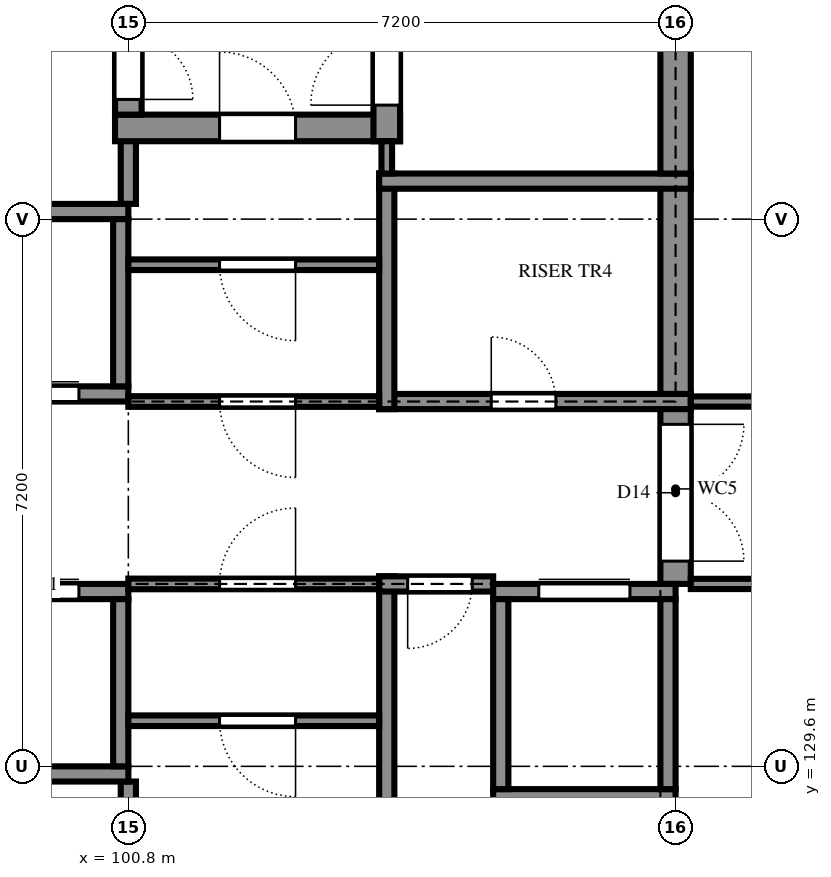
"""IFC4 building model, lengths in metres.
Left out: names, types, materials, properties, quantities, classifications, styles, units other than length and angle.
Written with IfcOpenShell. Run it as: python <this file> out.ifc"""

import sys

from ifc_helpers import new_model, si_unit, direction, frame, frame_2d, origin, place, context, subcontext, project, spatial, rectangle, extrude, element, fill, save


model = new_model("IFC4")
c1 = context("Model", 3, precision=1e-05, world=origin(), true_north=direction((0.0, 1.0)))
c2 = subcontext(c1, "Body", "Model", "MODEL_VIEW")
j1 = project(units=[si_unit("LENGTHUNIT", "METRE"), si_unit("PLANEANGLEUNIT", "RADIAN")], contexts=[c1])
p1 = place(None, origin())
s1 = spatial("IfcSite", under=j1, at=p1, CompositionType="ELEMENT")
p2 = place(p1, origin())
s2 = spatial("IfcBuilding", under=s1, at=p2, CompositionType="ELEMENT")
p3 = place(p2, frame((0.0, 0.0, 18.0)))
s3 = spatial("IfcBuildingStorey", under=s2, at=p3, CompositionType="ELEMENT", Elevation=18.0)
p4 = place(p3, frame((100.8, 128.575, 0.0), z_axis=(0.0, 0.0, 1.0), x_axis=(0.0, 1.0, 0.0)))
e1 = element("IfcWall", 1, at=p4, inside=s3, PredefinedType="SHEAR", context=c2, shape_type="SweptSolid", body=[
    extrude(rectangle(XDim=0.825, YDim=0.2, at=frame_2d((0.413, 0.0))), origin(), (0.0, 0.0, 1.0), 3.6),
])
p5 = place(p3, frame((104.2, 132.1, 0.0), z_axis=(0.0, 0.0, 1.0), x_axis=(0.0, -1.0, 0.0)))
e2 = element("IfcWall", 2, at=p5, inside=s3, PredefinedType="SHEAR", context=c2, shape_type="SweptSolid", body=[
    extrude(rectangle(XDim=3.525, YDim=0.2, at=frame_2d((1.763, 0.0))), origin(), (0.0, 0.0, 1.0), 3.6),
])
p6 = place(p3, frame((105.6, 132.0, 0.0), z_axis=(0.0, 0.0, 1.0), x_axis=(-1.0, 0.0, 0.0)))
e3 = element("IfcWall", 3, at=p6, inside=s3, PredefinedType="SHEAR", context=c2, shape_type="SweptSolid", body=[
    extrude(rectangle(XDim=1.5, YDim=0.2, at=frame_2d((0.75, 0.0))), origin(), (0.0, 0.0, 1.0), 3.6),
])
p7 = place(p6, frame((0.275, 0.0, 0.0)))
e4 = element("IfcOpeningElement", 4, at=p7, cuts=e3, PredefinedType="OPENING", context=c2, shape_type="SweptSolid", body=[
    extrude(rectangle(XDim=0.85, YDim=2.1, at=frame_2d((0.425, 1.05))), frame((0.0, 0.11, 0.0), z_axis=(0.0, -1.0, 0.0), x_axis=(1.0, 0.0, 0.0)), (0.0, 0.0, 1.0), 0.22),
])
p8 = place(p3, frame((108.0, 132.0, 0.0), z_axis=(0.0, 0.0, 1.0), x_axis=(0.0, 1.0, 0.0)))
e5 = element("IfcWall", 5, at=p8, inside=s3, PredefinedType="SHEAR", context=c2, shape_type="SweptSolid", body=[
    extrude(rectangle(XDim=2.5, YDim=0.4, at=frame_2d((1.25, 0.0))), origin(), (0.0, 0.0, 1.0), 3.6),
])
p9 = place(p8, frame((0.3, 0.0, 0.0)))
e6 = element("IfcOpeningElement", 6, at=p9, cuts=e5, PredefinedType="OPENING", context=c2, shape_type="SweptSolid", body=[
    extrude(rectangle(XDim=1.8, YDim=2.1, at=frame_2d((0.9, 1.05))), frame((0.0, 0.21, 0.0), z_axis=(0.0, -1.0, 0.0), x_axis=(1.0, 0.0, 0.0)), (0.0, 0.0, 1.0), 0.42),
])
p10 = place(p3, frame((104.1, 134.4, 0.0), z_axis=(0.0, 0.0, 1.0), x_axis=(1.0, 0.0, 0.0)))
e7 = element("IfcWall", 7, at=p10, inside=s3, PredefinedType="SHEAR", context=c2, shape_type="SweptSolid", body=[
    extrude(rectangle(XDim=4.1, YDim=0.2, at=frame_2d((2.05, 0.0))), origin(), (0.0, 0.0, 1.0), 3.6),
])
p11 = place(p10, frame((1.475, 0.0, 0.0)))
e8 = element("IfcOpeningElement", 8, at=p11, cuts=e7, PredefinedType="OPENING", context=c2, shape_type="SweptSolid", body=[
    extrude(rectangle(XDim=0.85, YDim=2.1, at=frame_2d((0.425, 1.05))), frame((0.0, 0.11, 0.0), z_axis=(0.0, -1.0, 0.0), x_axis=(1.0, 0.0, 0.0)), (0.0, 0.0, 1.0), 0.22),
])
p12 = place(p3, frame((108.0, 134.5, 0.0), z_axis=(0.0, 0.0, 1.0), x_axis=(0.0, 1.0, 0.0)))
e9 = element("IfcWall", 9, at=p12, inside=s3, PredefinedType="SHEAR", context=c2, shape_type="SweptSolid", body=[
    extrude(rectangle(XDim=2.9, YDim=0.4, at=frame_2d((1.45, 0.0))), origin(), (0.0, 0.0, 1.0), 3.6),
])
p13 = place(p3, frame((100.8, 137.0, 0.0), z_axis=(0.0, 0.0, 1.0), x_axis=(0.0, 1.0, 0.0)))
e10 = element("IfcWall", 10, at=p13, inside=s3, PredefinedType="SHEAR", context=c2, shape_type="SweptSolid", body=[
    extrude(rectangle(XDim=1.175, YDim=0.2, at=frame_2d((0.587, 0.0))), origin(), (0.0, 0.0, 1.0), 3.6),
])
p14 = place(p3, frame((104.2, 137.4, 0.0), z_axis=(0.0, 0.0, 1.0), x_axis=(0.0, -1.0, 0.0)))
e11 = element("IfcWall", 11, at=p14, inside=s3, PredefinedType="SHEAR", context=c2, shape_type="SweptSolid", body=[
    extrude(rectangle(XDim=3.1, YDim=0.2, at=frame_2d((1.55, 0.0))), origin(), (0.0, 0.0, 1.0), 3.6),
])
p15 = place(p3, frame((108.2, 137.3, 0.0), z_axis=(0.0, 0.0, 1.0), x_axis=(-1.0, 0.0, 0.0)))
e12 = element("IfcWall", 12, at=p15, inside=s3, PredefinedType="SHEAR", context=c2, shape_type="SweptSolid", body=[
    extrude(rectangle(XDim=4.1, YDim=0.2, at=frame_2d((2.05, 0.0))), origin(), (0.0, 0.0, 1.0), 3.6),
])
p16 = place(p3, frame((108.0, 137.4, 0.0), z_axis=(0.0, 0.0, 1.0), x_axis=(0.0, 1.0, 0.0)))
e13 = element("IfcWall", 13, at=p16, inside=s3, PredefinedType="SHEAR", context=c2, shape_type="SweptSolid", body=[
    extrude(rectangle(XDim=6.6, YDim=0.4, at=frame_2d((3.3, 0.0))), origin(), (0.0, 0.0, 1.0), 3.6),
])
p17 = place(p3, frame((100.625, 138.0, 0.0), z_axis=(0.0, 0.0, 1.0), x_axis=(1.0, 0.0, 0.0)))
e14 = element("IfcWall", 14, at=p17, inside=s3, PredefinedType="SHEAR", context=c2, shape_type="SweptSolid", body=[
    extrude(rectangle(XDim=3.75, YDim=0.35, at=frame_2d((1.875, 0.0))), origin(), (0.0, 0.0, 1.0), 3.6),
])
p18 = place(p17, frame((1.375, 0.0, 0.0)))
e15 = element("IfcOpeningElement", 15, at=p18, cuts=e14, PredefinedType="OPENING", context=c2, shape_type="SweptSolid", body=[
    extrude(rectangle(XDim=1.0, YDim=2.1, at=frame_2d((0.5, 1.05))), frame((0.0, 0.185, 0.0), z_axis=(0.0, -1.0, 0.0), x_axis=(1.0, 0.0, 0.0)), (0.0, 0.0, 1.0), 0.37),
])
p19 = place(p3, frame((104.2, 137.825, 0.0), z_axis=(0.0, 0.0, 1.0), x_axis=(0.0, 1.0, 0.0)))
e16 = element("IfcWall", 16, at=p19, inside=s3, PredefinedType="SHEAR", context=c2, shape_type="SweptSolid", body=[
    extrude(rectangle(XDim=3.475, YDim=0.35, at=frame_2d((1.738, 0.0))), origin(), (0.0, 0.0, 1.0), 3.6),
])
p20 = place(p19, frame((0.475, 0.0, 0.0)))
e17 = element("IfcOpeningElement", 17, at=p20, cuts=e16, PredefinedType="OPENING", context=c2, shape_type="SweptSolid", body=[
    extrude(rectangle(XDim=1.0, YDim=2.1, at=frame_2d((0.5, 1.05))), frame((0.0, 0.185, 0.0), z_axis=(0.0, -1.0, 0.0), x_axis=(1.0, 0.0, 0.0)), (0.0, 0.0, 1.0), 0.37),
])
p21 = place(p3, frame((100.8, 144.175, 0.0), z_axis=(0.0, 0.0, 1.0), x_axis=(0.0, -1.0, 0.0)))
e18 = element("IfcWall", 18, at=p21, inside=s3, PredefinedType="SHEAR", context=c2, shape_type="SweptSolid", body=[
    extrude(rectangle(XDim=6.0, YDim=0.35, at=frame_2d((3.0, 0.0))), origin(), (0.0, 0.0, 1.0), 3.6),
])
p22 = place(p21, frame((4.95, 0.0, 0.0)))
e19 = element("IfcOpeningElement", 19, at=p22, cuts=e18, PredefinedType="OPENING", context=c2, shape_type="SweptSolid", body=[
    extrude(rectangle(XDim=0.85, YDim=2.1, at=frame_2d((0.425, 1.05))), frame((0.0, 0.185, 0.0), z_axis=(0.0, -1.0, 0.0), x_axis=(1.0, 0.0, 0.0)), (0.0, 0.0, 1.0), 0.37),
])
p23 = place(p3, frame((98.4, 129.5, 0.0), z_axis=(0.0, 0.0, 1.0), x_axis=(1.0, 0.0, 0.0)))
e20 = element("IfcWall", 20, at=p23, inside=s3, PredefinedType="SHEAR", context=c2, shape_type="SweptSolid", body=[
    extrude(rectangle(XDim=2.4, YDim=0.2, at=frame_2d((1.2, 0.0))), origin(), (0.0, 0.0, 1.0), 3.6),
])
p24 = place(p3, frame((98.4, 131.9, 0.0), z_axis=(0.0, 0.0, 1.0), x_axis=(1.0, 0.0, 0.0)))
e21 = element("IfcWall", 21, at=p24, inside=s3, PredefinedType="SHEAR", context=c2, shape_type="SweptSolid", body=[
    extrude(rectangle(XDim=2.4, YDim=0.2, at=frame_2d((1.2, 0.0))), origin(), (0.0, 0.0, 1.0), 3.6),
])
p25 = place(p24, frame((0.65, 0.0, 0.0)))
e22 = element("IfcOpeningElement", 22, at=p25, cuts=e21, PredefinedType="OPENING", context=c2, shape_type="SweptSolid", body=[
    extrude(rectangle(XDim=1.1, YDim=2.1, at=frame_2d((0.55, 1.05))), frame((0.0, 0.11, 0.0), z_axis=(0.0, -1.0, 0.0), x_axis=(1.0, 0.0, 0.0)), (0.0, 0.0, 1.0), 0.22),
])
p26 = place(p3, frame((100.7, 129.6, 0.0), z_axis=(0.0, 0.0, 1.0), x_axis=(0.0, 1.0, 0.0)))
e23 = element("IfcWall", 23, at=p26, inside=s3, PredefinedType="SHEAR", context=c2, shape_type="SweptSolid", body=[
    extrude(rectangle(XDim=2.2, YDim=0.2, at=frame_2d((1.1, 0.0))), origin(), (0.0, 0.0, 1.0), 3.6),
])
p27 = place(p3, frame((98.4, 134.5, 0.0), z_axis=(0.0, 0.0, 1.0), x_axis=(1.0, 0.0, 0.0)))
e24 = element("IfcWall", 24, at=p27, inside=s3, PredefinedType="SHEAR", context=c2, shape_type="SweptSolid", body=[
    extrude(rectangle(XDim=2.4, YDim=0.2, at=frame_2d((1.2, 0.0))), origin(), (0.0, 0.0, 1.0), 3.6),
])
p28 = place(p27, frame((0.65, 0.0, 0.0)))
e25 = element("IfcOpeningElement", 25, at=p28, cuts=e24, PredefinedType="OPENING", context=c2, shape_type="SweptSolid", body=[
    extrude(rectangle(XDim=1.1, YDim=2.1, at=frame_2d((0.55, 1.05))), frame((0.0, 0.11, 0.0), z_axis=(0.0, -1.0, 0.0), x_axis=(1.0, 0.0, 0.0)), (0.0, 0.0, 1.0), 0.22),
])
p29 = place(p3, frame((98.4, 136.9, 0.0), z_axis=(0.0, 0.0, 1.0), x_axis=(1.0, 0.0, 0.0)))
e26 = element("IfcWall", 26, at=p29, inside=s3, PredefinedType="SHEAR", context=c2, shape_type="SweptSolid", body=[
    extrude(rectangle(XDim=2.4, YDim=0.2, at=frame_2d((1.2, 0.0))), origin(), (0.0, 0.0, 1.0), 3.6),
])
p30 = place(p3, frame((100.7, 134.6, 0.0), z_axis=(0.0, 0.0, 1.0), x_axis=(0.0, 1.0, 0.0)))
e27 = element("IfcWall", 27, at=p30, inside=s3, PredefinedType="SHEAR", context=c2, shape_type="SweptSolid", body=[
    extrude(rectangle(XDim=2.2, YDim=0.2, at=frame_2d((1.1, 0.0))), origin(), (0.0, 0.0, 1.0), 3.6),
])
p31 = place(p3, frame((105.6, 129.2, 0.0), z_axis=(0.0, 0.0, 1.0), x_axis=(1.0, 0.0, 0.0)))
e28 = element("IfcWall", 28, at=p31, inside=s3, PredefinedType="SHEAR", context=c2, shape_type="SweptSolid", body=[
    extrude(rectangle(XDim=2.4, YDim=0.2, at=frame_2d((1.2, 0.0))), origin(), (0.0, 0.0, 1.0), 3.6),
])
p32 = place(p3, frame((105.6, 131.9, 0.0), z_axis=(0.0, 0.0, 1.0), x_axis=(1.0, 0.0, 0.0)))
e29 = element("IfcWall", 29, at=p32, inside=s3, PredefinedType="SHEAR", context=c2, shape_type="SweptSolid", body=[
    extrude(rectangle(XDim=2.4, YDim=0.2, at=frame_2d((1.2, 0.0))), origin(), (0.0, 0.0, 1.0), 3.6),
])
p33 = place(p32, frame((0.6, 0.0, 0.0)))
e30 = element("IfcOpeningElement", 30, at=p33, cuts=e29, PredefinedType="OPENING", context=c2, shape_type="SweptSolid", body=[
    extrude(rectangle(XDim=1.2, YDim=2.1, at=frame_2d((0.6, 1.05))), frame((0.0, 0.11, 0.0), z_axis=(0.0, -1.0, 0.0), x_axis=(1.0, 0.0, 0.0)), (0.0, 0.0, 1.0), 0.22),
])
for number, where, z_axis, x_axis in (
    (31, (105.7, 129.3, 0.0), (0.0, 0.0, 1.0), (0.0, 1.0, 0.0)),
    (32, (107.9, 129.3, 0.0), (0.0, 0.0, 1.0), (0.0, 1.0, 0.0)),
):
    element("IfcWall", number, at=place(p3, frame(where, z_axis=z_axis, x_axis=x_axis)), inside=s3, PredefinedType="SHEAR", context=c2, shape_type="SweptSolid", body=[
        extrude(rectangle(XDim=2.5, YDim=0.2, at=frame_2d((1.25, 0.0))), origin(), (0.0, 0.0, 1.0), 3.6),
    ])
p34 = place(p3, frame((100.8, 130.2, 0.0), z_axis=(0.0, 0.0, 1.0), x_axis=(1.0, 0.0, 0.0)))
e33 = element("IfcWall", 33, at=p34, inside=s3, PredefinedType="PARTITIONING", context=c2, shape_type="SweptSolid", body=[
    extrude(rectangle(XDim=3.3, YDim=0.14, at=frame_2d((1.65, 0.0))), origin(), (0.0, 0.0, 1.0), 3.46),
])
p35 = place(p34, frame((1.2, 0.0, 0.0)))
e34 = element("IfcOpeningElement", 34, at=p35, cuts=e33, PredefinedType="OPENING", context=c2, shape_type="SweptSolid", body=[
    extrude(rectangle(XDim=1.0, YDim=2.1, at=frame_2d((0.5, 1.05))), frame((0.0, 0.08, 0.0), z_axis=(0.0, -1.0, 0.0), x_axis=(1.0, 0.0, 0.0)), (0.0, 0.0, 1.0), 0.16),
])
p36 = place(p3, frame((100.8, 132.0, 0.0), z_axis=(0.0, 0.0, 1.0), x_axis=(1.0, 0.0, 0.0)))
e35 = element("IfcWall", 35, at=p36, inside=s3, PredefinedType="PARTITIONING", context=c2, shape_type="SweptSolid", body=[
    extrude(rectangle(XDim=3.3, YDim=0.14, at=frame_2d((1.65, 0.0))), origin(), (0.0, 0.0, 1.0), 3.46),
])
p37 = place(p36, frame((1.2, 0.0, 0.0)))
e36 = element("IfcOpeningElement", 36, at=p37, cuts=e35, PredefinedType="OPENING", context=c2, shape_type="SweptSolid", body=[
    extrude(rectangle(XDim=1.0, YDim=2.1, at=frame_2d((0.5, 1.05))), frame((0.0, 0.08, 0.0), z_axis=(0.0, -1.0, 0.0), x_axis=(1.0, 0.0, 0.0)), (0.0, 0.0, 1.0), 0.16),
])
p38 = place(p3, frame((108.2, 132.0, 0.0), z_axis=(0.0, 0.0, 1.0), x_axis=(1.0, 0.0, 0.0)))
e37 = element("IfcWall", 37, at=p38, inside=s3, PredefinedType="PARTITIONING", context=c2, shape_type="SweptSolid", body=[
    extrude(rectangle(XDim=19.258, YDim=0.135, at=frame_2d((9.629, 0.0))), origin(), (0.0, 0.0, 1.0), 3.16),
])
p39 = place(p38, frame((2.9, 0.0, 0.0)))
e38 = element("IfcOpeningElement", 38, at=p39, cuts=e37, PredefinedType="OPENING", context=c2, shape_type="SweptSolid", body=[
    extrude(rectangle(XDim=1.0, YDim=2.4, at=frame_2d((0.5, 1.2))), frame((0.0, 0.077, 0.0), z_axis=(0.0, -1.0, 0.0), x_axis=(1.0, 0.0, 0.0)), (0.0, 0.0, 1.0), 0.155),
])
p40 = place(p38, frame((10.1, 0.0, 0.0)))
e39 = element("IfcOpeningElement", 39, at=p40, cuts=e37, PredefinedType="OPENING", context=c2, shape_type="SweptSolid", body=[
    extrude(rectangle(XDim=1.0, YDim=2.4, at=frame_2d((0.5, 1.2))), frame((0.0, 0.077, 0.0), z_axis=(0.0, -1.0, 0.0), x_axis=(1.0, 0.0, 0.0)), (0.0, 0.0, 1.0), 0.155),
])
p41 = place(p38, frame((18.1, 0.0, 0.0)))
e40 = element("IfcOpeningElement", 40, at=p41, cuts=e37, PredefinedType="OPENING", context=c2, shape_type="SweptSolid", body=[
    extrude(rectangle(XDim=1.0, YDim=2.4, at=frame_2d((0.5, 1.2))), frame((0.0, 0.077, 0.0), z_axis=(0.0, -1.0, 0.0), x_axis=(1.0, 0.0, 0.0)), (0.0, 0.0, 1.0), 0.155),
])
p42 = place(p3, frame((100.8, 134.4, 0.0), z_axis=(0.0, 0.0, 1.0), x_axis=(1.0, 0.0, 0.0)))
e41 = element("IfcWall", 41, at=p42, inside=s3, PredefinedType="PARTITIONING", context=c2, shape_type="SweptSolid", body=[
    extrude(rectangle(XDim=3.3, YDim=0.14, at=frame_2d((1.65, 0.0))), origin(), (0.0, 0.0, 1.0), 3.46),
])
p43 = place(p42, frame((1.2, 0.0, 0.0)))
e42 = element("IfcOpeningElement", 42, at=p43, cuts=e41, PredefinedType="OPENING", context=c2, shape_type="SweptSolid", body=[
    extrude(rectangle(XDim=1.0, YDim=2.1, at=frame_2d((0.5, 1.05))), frame((0.0, 0.08, 0.0), z_axis=(0.0, -1.0, 0.0), x_axis=(1.0, 0.0, 0.0)), (0.0, 0.0, 1.0), 0.16),
])
p44 = place(p3, frame((108.2, 134.4, 0.0), z_axis=(0.0, 0.0, 1.0), x_axis=(1.0, 0.0, 0.0)))
e43 = element("IfcWall", 43, at=p44, inside=s3, PredefinedType="PARTITIONING", context=c2, shape_type="SweptSolid", body=[
    extrude(rectangle(XDim=25.07, YDim=0.135, at=frame_2d((12.535, 0.0))), origin(), (0.0, 0.0, 1.0), 3.16),
])
p45 = place(p44, frame((2.5, 0.0, 0.0)))
e44 = element("IfcOpeningElement", 44, at=p45, cuts=e43, PredefinedType="OPENING", context=c2, shape_type="SweptSolid", body=[
    extrude(rectangle(XDim=1.8, YDim=2.1, at=frame_2d((0.9, 1.05))), frame((0.0, 0.077, 0.0), z_axis=(0.0, -1.0, 0.0), x_axis=(1.0, 0.0, 0.0)), (0.0, 0.0, 1.0), 0.155),
])
p46 = place(p44, frame((9.7, 0.0, 0.0)))
e45 = element("IfcOpeningElement", 45, at=p46, cuts=e43, PredefinedType="OPENING", context=c2, shape_type="SweptSolid", body=[
    extrude(rectangle(XDim=1.8, YDim=2.1, at=frame_2d((0.9, 1.05))), frame((0.0, 0.077, 0.0), z_axis=(0.0, -1.0, 0.0), x_axis=(1.0, 0.0, 0.0)), (0.0, 0.0, 1.0), 0.155),
])
p47 = place(p44, frame((16.9, 0.0, 0.0)))
e46 = element("IfcOpeningElement", 46, at=p47, cuts=e43, PredefinedType="OPENING", context=c2, shape_type="SweptSolid", body=[
    extrude(rectangle(XDim=1.8, YDim=2.1, at=frame_2d((0.9, 1.05))), frame((0.0, 0.077, 0.0), z_axis=(0.0, -1.0, 0.0), x_axis=(1.0, 0.0, 0.0)), (0.0, 0.0, 1.0), 0.155),
])
p48 = place(p44, frame((22.7, 0.0, 0.0)))
e47 = element("IfcOpeningElement", 47, at=p48, cuts=e43, PredefinedType="OPENING", context=c2, shape_type="SweptSolid", body=[
    extrude(rectangle(XDim=1.0, YDim=2.4, at=frame_2d((0.5, 1.2))), frame((0.0, 0.077, 0.0), z_axis=(0.0, -1.0, 0.0), x_axis=(1.0, 0.0, 0.0)), (0.0, 0.0, 1.0), 0.155),
])
p49 = place(p3, frame((100.8, 136.2, 0.0), z_axis=(0.0, 0.0, 1.0), x_axis=(1.0, 0.0, 0.0)))
e48 = element("IfcWall", 48, at=p49, inside=s3, PredefinedType="PARTITIONING", context=c2, shape_type="SweptSolid", body=[
    extrude(rectangle(XDim=3.3, YDim=0.14, at=frame_2d((1.65, 0.0))), origin(), (0.0, 0.0, 1.0), 3.46),
])
p50 = place(p49, frame((1.2, 0.0, 0.0)))
e49 = element("IfcOpeningElement", 49, at=p50, cuts=e48, PredefinedType="OPENING", context=c2, shape_type="SweptSolid", body=[
    extrude(rectangle(XDim=1.0, YDim=2.1, at=frame_2d((0.5, 1.05))), frame((0.0, 0.08, 0.0), z_axis=(0.0, -1.0, 0.0), x_axis=(1.0, 0.0, 0.0)), (0.0, 0.0, 1.0), 0.16),
])
p51 = place(p3, frame((104.2, 137.4, 0.0), z_axis=(0.0, 0.0, 1.0), x_axis=(0.0, 1.0, 0.0)))
e50 = element("IfcWall", 50, at=p51, inside=s3, PredefinedType="PARTITIONING", context=c2, shape_type="SweptSolid", body=[
    extrude(rectangle(XDim=0.425, YDim=0.14, at=frame_2d((0.212, 0.0))), origin(), (0.0, 0.0, 1.0), 3.46),
])
p52 = place(p25, origin())
e51 = element("IfcDoor", 51, at=p52, inside=s3, OperationType="SLIDING_TO_LEFT", PredefinedType="DOOR", context=c2, shape_type="SweptSolid", body=[
    extrude(rectangle(XDim=1.1, YDim=2.1, at=frame_2d((0.55, 1.05))), frame((0.0, 0.025, 0.0), z_axis=(0.0, -1.0, 0.0), x_axis=(1.0, 0.0, 0.0)), (0.0, 0.0, 1.0), 0.05),
])
fill(e22, e51)
p53 = place(p28, origin())
e52 = element("IfcDoor", 52, at=p53, inside=s3, OperationType="SLIDING_TO_LEFT", PredefinedType="DOOR", context=c2, shape_type="SweptSolid", body=[
    extrude(rectangle(XDim=1.1, YDim=2.1, at=frame_2d((0.55, 1.05))), frame((0.0, 0.025, 0.0), z_axis=(0.0, -1.0, 0.0), x_axis=(1.0, 0.0, 0.0)), (0.0, 0.0, 1.0), 0.05),
])
fill(e25, e52)
p54 = place(p33, origin())
e53 = element("IfcDoor", 53, at=p54, inside=s3, OperationType="SLIDING_TO_LEFT", PredefinedType="DOOR", context=c2, shape_type="SweptSolid", body=[
    extrude(rectangle(XDim=1.2, YDim=2.1, at=frame_2d((0.6, 1.05))), frame((0.0, 0.025, 0.0), z_axis=(0.0, -1.0, 0.0), x_axis=(1.0, 0.0, 0.0)), (0.0, 0.0, 1.0), 0.05),
])
fill(e30, e53)
p55 = place(p35, frame((1.0, 0.0, 0.0), z_axis=(0.0, 0.0, 1.0), x_axis=(-1.0, 0.0, 0.0)))
e54 = element("IfcDoor", 54, at=p55, inside=s3, OperationType="SINGLE_SWING_RIGHT", PredefinedType="DOOR", context=c2, shape_type="SweptSolid", body=[
    extrude(rectangle(XDim=1.0, YDim=2.1, at=frame_2d((0.5, 1.05))), frame((0.0, 0.025, 0.0), z_axis=(0.0, -1.0, 0.0), x_axis=(1.0, 0.0, 0.0)), (0.0, 0.0, 1.0), 0.05),
])
fill(e34, e54)
p56 = place(p37, origin())
e55 = element("IfcDoor", 55, at=p56, inside=s3, OperationType="SINGLE_SWING_LEFT", PredefinedType="DOOR", context=c2, shape_type="SweptSolid", body=[
    extrude(rectangle(XDim=1.0, YDim=2.1, at=frame_2d((0.5, 1.05))), frame((0.0, 0.025, 0.0), z_axis=(0.0, -1.0, 0.0), x_axis=(1.0, 0.0, 0.0)), (0.0, 0.0, 1.0), 0.05),
])
fill(e36, e55)
p57 = place(p43, frame((1.0, 0.0, 0.0), z_axis=(0.0, 0.0, 1.0), x_axis=(-1.0, 0.0, 0.0)))
e56 = element("IfcDoor", 56, at=p57, inside=s3, OperationType="SINGLE_SWING_RIGHT", PredefinedType="DOOR", context=c2, shape_type="SweptSolid", body=[
    extrude(rectangle(XDim=1.0, YDim=2.1, at=frame_2d((0.5, 1.05))), frame((0.0, 0.025, 0.0), z_axis=(0.0, -1.0, 0.0), x_axis=(1.0, 0.0, 0.0)), (0.0, 0.0, 1.0), 0.05),
])
fill(e42, e56)
p58 = place(p50, frame((1.0, 0.0, 0.0), z_axis=(0.0, 0.0, 1.0), x_axis=(-1.0, 0.0, 0.0)))
e57 = element("IfcDoor", 57, at=p58, inside=s3, OperationType="SINGLE_SWING_RIGHT", PredefinedType="DOOR", context=c2, shape_type="SweptSolid", body=[
    extrude(rectangle(XDim=1.0, YDim=2.1, at=frame_2d((0.5, 1.05))), frame((0.0, 0.025, 0.0), z_axis=(0.0, -1.0, 0.0), x_axis=(1.0, 0.0, 0.0)), (0.0, 0.0, 1.0), 0.05),
])
fill(e49, e57)
p59 = place(p7, origin())
e58 = element("IfcDoor", 58, at=p59, inside=s3, OperationType="SINGLE_SWING_LEFT", PredefinedType="DOOR", context=c2, shape_type="SweptSolid", body=[
    extrude(rectangle(XDim=0.85, YDim=2.1, at=frame_2d((0.425, 1.05))), frame((0.0, 0.025, 0.0), z_axis=(0.0, -1.0, 0.0), x_axis=(1.0, 0.0, 0.0)), (0.0, 0.0, 1.0), 0.05),
])
fill(e4, e58)
p60 = place(p11, origin())
e59 = element("IfcDoor", 59, at=p60, inside=s3, OperationType="SINGLE_SWING_RIGHT", PredefinedType="DOOR", context=c2, shape_type="SweptSolid", body=[
    extrude(rectangle(XDim=0.85, YDim=2.1, at=frame_2d((0.425, 1.05))), frame((0.0, 0.025, 0.0), z_axis=(0.0, -1.0, 0.0), x_axis=(1.0, 0.0, 0.0)), (0.0, 0.0, 1.0), 0.05),
])
fill(e8, e59)
p61 = place(p18, origin())
e60 = element("IfcDoor", 60, at=p61, inside=s3, OperationType="SINGLE_SWING_RIGHT", PredefinedType="DOOR", context=c2, shape_type="SweptSolid", body=[
    extrude(rectangle(XDim=1.0, YDim=2.1, at=frame_2d((0.5, 1.05))), frame((0.0, 0.025, 0.0), z_axis=(0.0, -1.0, 0.0), x_axis=(1.0, 0.0, 0.0)), (0.0, 0.0, 1.0), 0.05),
])
fill(e15, e60)
p62 = place(p22, origin())
e61 = element("IfcDoor", 61, at=p62, inside=s3, OperationType="SINGLE_SWING_LEFT", PredefinedType="DOOR", context=c2, shape_type="SweptSolid", body=[
    extrude(rectangle(XDim=0.85, YDim=2.1, at=frame_2d((0.425, 1.05))), frame((0.0, 0.025, 0.0), z_axis=(0.0, -1.0, 0.0), x_axis=(1.0, 0.0, 0.0)), (0.0, 0.0, 1.0), 0.05),
])
fill(e19, e61)
p63 = place(p20, origin())
e62 = element("IfcDoor", 62, at=p63, inside=s3, OperationType="SINGLE_SWING_RIGHT", PredefinedType="DOOR", context=c2, shape_type="SweptSolid", body=[
    extrude(rectangle(XDim=1.0, YDim=2.1, at=frame_2d((0.5, 1.05))), frame((0.0, 0.025, 0.0), z_axis=(0.0, -1.0, 0.0), x_axis=(1.0, 0.0, 0.0)), (0.0, 0.0, 1.0), 0.05),
])
fill(e17, e62)
p64 = place(p9, frame((1.8, 0.0, 0.0), z_axis=(0.0, 0.0, 1.0), x_axis=(-1.0, 0.0, 0.0)))
e63 = element("IfcDoor", 63, at=p64, inside=s3, OperationType="DOUBLE_DOOR_SINGLE_SWING", PredefinedType="DOOR", context=c2, shape_type="SweptSolid", body=[
    extrude(rectangle(XDim=1.8, YDim=2.1, at=frame_2d((0.9, 1.05))), frame((0.0, 0.025, 0.0), z_axis=(0.0, -1.0, 0.0), x_axis=(1.0, 0.0, 0.0)), (0.0, 0.0, 1.0), 0.05),
])
fill(e6, e63)
save(model, sys.argv[1])
